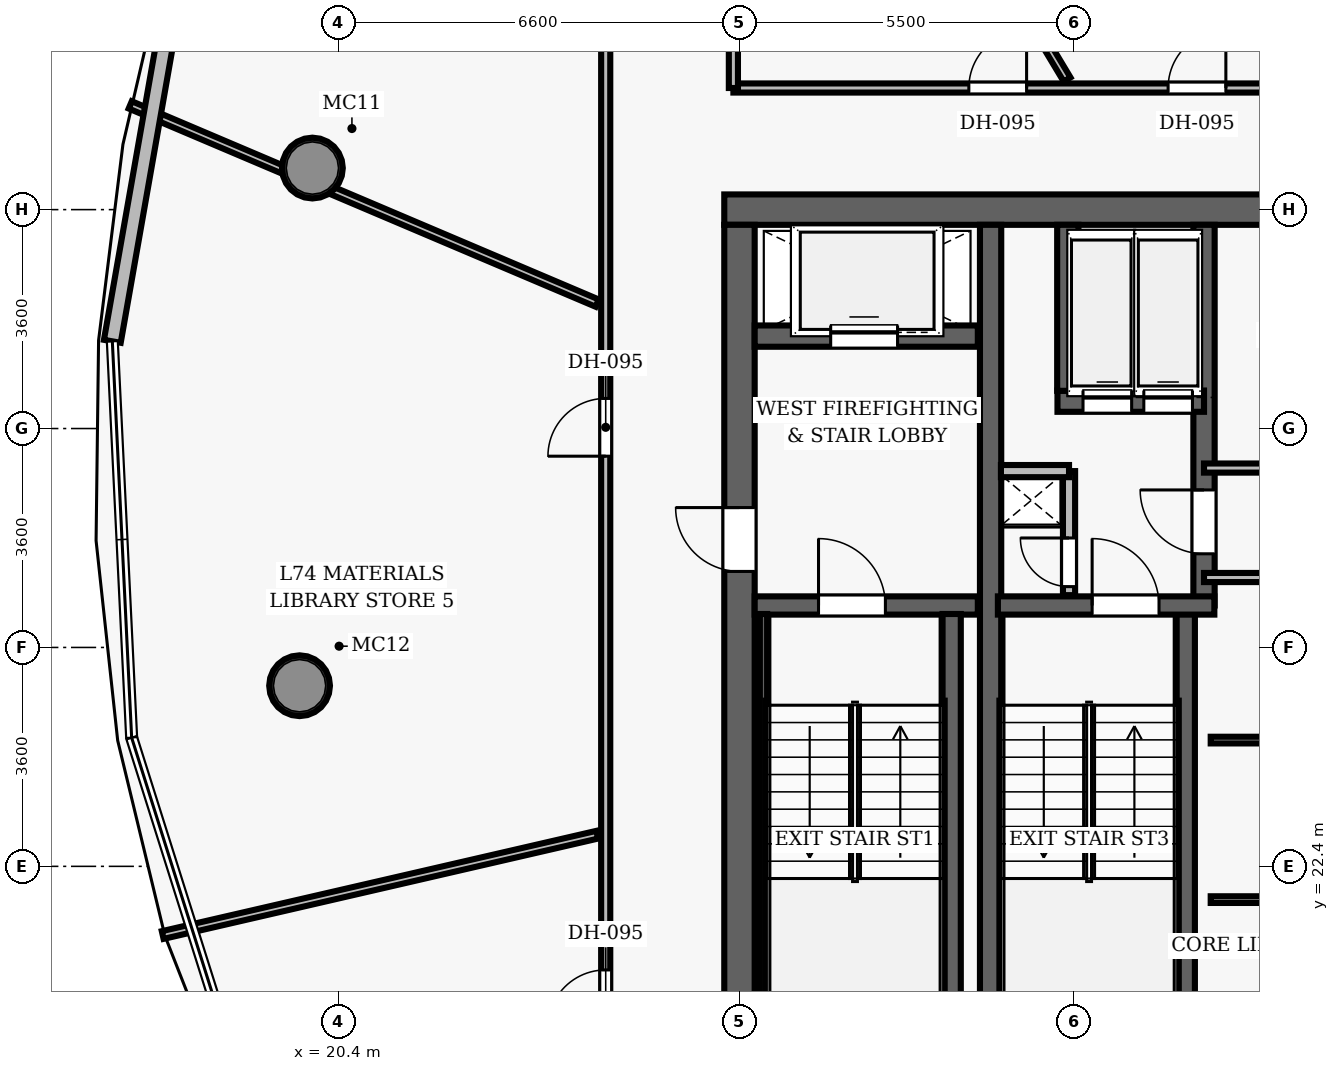
"""IFC4 building model, lengths in metres.
Left out: names, types, materials, properties, quantities, classifications, styles, units other than length and angle.
Written with IfcOpenShell. Run it as: python <this file> out.ifc"""

import sys

from ifc_helpers import new_model, si_unit, direction, frame, frame_2d, origin, origin_2d, place, context, subcontext, project, spatial, rectangle, hollow_circle, extrude, element, fill, save


model = new_model("IFC4")
c1 = context("Model", 3, precision=1e-05, world=origin(), true_north=direction((0.0, 1.0)))
c2 = subcontext(c1, "Body", "Model", "MODEL_VIEW")
j1 = project(units=[si_unit("LENGTHUNIT", "METRE"), si_unit("PLANEANGLEUNIT", "RADIAN")], contexts=[c1])
p1 = place(None, origin())
s1 = spatial("IfcSite", under=j1, at=p1, CompositionType="ELEMENT")
p2 = place(p1, origin())
s2 = spatial("IfcBuilding", under=s1, at=p2, CompositionType="ELEMENT")
p3 = place(p2, frame((0.0, 0.0, 292.1)))
s3 = spatial("IfcBuildingStorey", under=s2, at=p3, CompositionType="ELEMENT", Elevation=292.1)
p4 = place(p3, frame((26.75, 33.2, 0.0), z_axis=(0.0, 0.0, 1.0), x_axis=(1.0, 0.0, 0.0)))
e1 = element("IfcWall", 1, at=p4, inside=s3, PredefinedType="SHEAR", context=c2, shape_type="SweptSolid", body=[
    extrude(rectangle(XDim=22.5, YDim=0.5, at=frame_2d((11.25, 0.0))), origin(), (0.0, 0.0, 1.0), 3.85),
])
p5 = place(p3, frame((27.0, 19.05, 0.0), z_axis=(0.0, 0.0, 1.0), x_axis=(0.0, 1.0, 0.0)))
e2 = element("IfcWall", 2, at=p5, inside=s3, PredefinedType="SHEAR", context=c2, shape_type="SweptSolid", body=[
    extrude(rectangle(XDim=13.9, YDim=0.5, at=frame_2d((6.95, 0.0))), origin(), (0.0, 0.0, 1.0), 3.85),
])
p6 = place(p5, frame((8.2, 0.0, 0.0)))
e3 = element("IfcOpeningElement", 3, at=p6, cuts=e2, PredefinedType="OPENING", context=c2, shape_type="SweptSolid", body=[
    extrude(rectangle(XDim=1.05, YDim=2.15, at=frame_2d((0.525, 1.075))), frame((0.0, 0.26, 0.0), z_axis=(0.0, -1.0, 0.0), x_axis=(1.0, 0.0, 0.0)), (0.0, 0.0, 1.0), 0.52),
])
p7 = place(p3, frame((31.13, 19.05, 0.0), z_axis=(0.0, 0.0, 1.0), x_axis=(0.0, 1.0, 0.0)))
e4 = element("IfcWall", 4, at=p7, inside=s3, PredefinedType="SHEAR", context=c2, shape_type="SweptSolid", body=[
    extrude(rectangle(XDim=13.9, YDim=0.35, at=frame_2d((6.95, 0.0))), origin(), (0.0, 0.0, 1.0), 3.85),
])
for number, where, z_axis, x_axis in (
    (5, (19.976, 33.884, 0.0), (0.0, 0.0, 1.0), (1.0, 0.0, 0.0)),
    (6, (19.765, 25.371, 0.0), (0.0, 0.0, 1.0), (1.0, 0.0, 0.0)),
):
    element("IfcColumn", number, at=place(p3, frame(where, z_axis=z_axis, x_axis=x_axis)), inside=s3, PredefinedType="COLUMN", context=c2, shape_type="SweptSolid", body=[
        extrude(hollow_circle(Radius=0.5, WallThickness=0.045, at=origin_2d()), origin(), (0.0, 0.0, 1.0), 3.85),
    ])
p8 = place(p3, frame((27.25, 26.69, 0.0), z_axis=(0.0, 0.0, 1.0), x_axis=(1.0, 0.0, 0.0)))
e7 = element("IfcWall", 7, at=p8, inside=s3, PredefinedType="SHEAR", context=c2, shape_type="SweptSolid", body=[
    extrude(rectangle(XDim=3.67, YDim=0.3, at=frame_2d((1.835, 0.0))), origin(), (0.0, 0.0, 1.0), 3.85),
])
p9 = place(p8, frame((1.05, 0.0, 0.0)))
e8 = element("IfcOpeningElement", 8, at=p9, cuts=e7, PredefinedType="OPENING", context=c2, shape_type="SweptSolid", body=[
    extrude(rectangle(XDim=1.1, YDim=2.15, at=frame_2d((0.55, 1.075))), frame((0.0, 0.16, 0.0), z_axis=(0.0, -1.0, 0.0), x_axis=(1.0, 0.0, 0.0)), (0.0, 0.0, 1.0), 0.32),
])
p10 = place(p3, frame((30.49, 19.05, 0.0), z_axis=(0.0, 0.0, 1.0), x_axis=(0.0, 1.0, 0.0)))
e9 = element("IfcWall", 9, at=p10, inside=s3, PredefinedType="SHEAR", context=c2, shape_type="SweptSolid", body=[
    extrude(rectangle(XDim=7.5, YDim=0.3, at=frame_2d((3.75, 0.0))), origin(), (0.0, 0.0, 1.0), 3.85),
])
p11 = place(p3, frame((27.395, 19.1, 0.0), z_axis=(0.0, 0.0, 1.0), x_axis=(0.0, 1.0, 0.0)))
e10 = element("IfcWall", 10, at=p11, inside=s3, PredefinedType="SHEAR", context=c2, shape_type="SweptSolid", body=[
    extrude(rectangle(XDim=7.45, YDim=0.12, at=frame_2d((3.725, 0.0))), origin(), (0.0, 0.0, 1.0), 3.85),
])
p12 = place(p3, frame((27.25, 31.12, 0.0), z_axis=(0.0, 0.0, 1.0), x_axis=(1.0, 0.0, 0.0)))
e11 = element("IfcWall", 11, at=p12, inside=s3, PredefinedType="SHEAR", context=c2, shape_type="SweptSolid", body=[
    extrude(rectangle(XDim=3.67, YDim=0.35, at=frame_2d((1.835, 0.0))), origin(), (0.0, 0.0, 1.0), 3.04),
])
p13 = place(p12, frame((1.25, 0.0, 0.0)))
e12 = element("IfcOpeningElement", 12, at=p13, cuts=e11, PredefinedType="OPENING", context=c2, shape_type="SweptSolid", body=[
    extrude(rectangle(XDim=1.1, YDim=2.15, at=frame_2d((0.55, 1.075))), frame((0.0, 0.185, 0.0), z_axis=(0.0, -1.0, 0.0), x_axis=(1.0, 0.0, 0.0)), (0.0, 0.0, 1.0), 0.37),
])
p14 = place(p3, frame((34.34, 19.05, 0.0), z_axis=(0.0, 0.0, 1.0), x_axis=(0.0, 1.0, 0.0)))
e13 = element("IfcWall", 13, at=p14, inside=s3, PredefinedType="SHEAR", context=c2, shape_type="SweptSolid", body=[
    extrude(rectangle(XDim=7.5, YDim=0.3, at=frame_2d((3.75, 0.0))), origin(), (0.0, 0.0, 1.0), 3.85),
])
p15 = place(p3, frame((34.64, 26.69, 0.0), z_axis=(0.0, 0.0, 1.0), x_axis=(0.0, 1.0, 0.0)))
e14 = element("IfcWall", 14, at=p15, inside=s3, PredefinedType="SHEAR", context=c2, shape_type="SweptSolid", body=[
    extrude(rectangle(XDim=6.26, YDim=0.35, at=frame_2d((3.13, 0.0))), origin(), (0.0, 0.0, 1.0), 3.85),
])
p16 = place(p15, frame((0.85, 0.0, 0.0)))
e15 = element("IfcOpeningElement", 15, at=p16, cuts=e14, PredefinedType="OPENING", context=c2, shape_type="SweptSolid", body=[
    extrude(rectangle(XDim=1.05, YDim=2.15, at=frame_2d((0.525, 1.075))), frame((0.0, 0.185, 0.0), z_axis=(0.0, -1.0, 0.0), x_axis=(1.0, 0.0, 0.0)), (0.0, 0.0, 1.0), 0.37),
])
p17 = place(p3, frame((31.25, 26.69, 0.0), z_axis=(0.0, 0.0, 1.0), x_axis=(1.0, 0.0, 0.0)))
e16 = element("IfcWall", 16, at=p17, inside=s3, PredefinedType="SHEAR", context=c2, shape_type="SweptSolid", body=[
    extrude(rectangle(XDim=3.56, YDim=0.3, at=frame_2d((1.78, 0.0))), origin(), (0.0, 0.0, 1.0), 3.85),
])
p18 = place(p17, frame((1.55, 0.0, 0.0)))
e17 = element("IfcOpeningElement", 17, at=p18, cuts=e16, PredefinedType="OPENING", context=c2, shape_type="SweptSolid", body=[
    extrude(rectangle(XDim=1.1, YDim=2.15, at=frame_2d((0.55, 1.075))), frame((0.0, 0.16, 0.0), z_axis=(0.0, -1.0, 0.0), x_axis=(1.0, 0.0, 0.0)), (0.0, 0.0, 1.0), 0.32),
])
p19 = place(p3, frame((32.23, 30.05, 0.0), z_axis=(0.0, 0.0, 1.0), x_axis=(1.0, 0.0, 0.0)))
e18 = element("IfcWall", 18, at=p19, inside=s3, PredefinedType="SHEAR", context=c2, shape_type="SweptSolid", body=[
    extrude(rectangle(XDim=2.41, YDim=0.35, at=frame_2d((1.205, 0.0))), origin(), (0.0, 0.0, 1.0), 3.04),
])
p20 = place(p19, frame((0.42, 0.0, 0.0)))
e19 = element("IfcOpeningElement", 19, at=p20, cuts=e18, PredefinedType="OPENING", context=c2, shape_type="SweptSolid", body=[
    extrude(rectangle(XDim=0.8, YDim=2.15, at=frame_2d((0.4, 1.075))), frame((0.0, 0.185, 0.0), z_axis=(0.0, -1.0, 0.0), x_axis=(1.0, 0.0, 0.0)), (0.0, 0.0, 1.0), 0.37),
])
p21 = place(p19, frame((1.42, 0.0, 0.0)))
e20 = element("IfcOpeningElement", 20, at=p21, cuts=e18, PredefinedType="OPENING", context=c2, shape_type="SweptSolid", body=[
    extrude(rectangle(XDim=0.8, YDim=2.15, at=frame_2d((0.4, 1.075))), frame((0.0, 0.185, 0.0), z_axis=(0.0, -1.0, 0.0), x_axis=(1.0, 0.0, 0.0)), (0.0, 0.0, 1.0), 0.37),
])
p22 = place(p3, frame((32.4, 30.22, 0.0), z_axis=(0.0, 0.0, 1.0), x_axis=(0.0, 1.0, 0.0)))
e21 = element("IfcWall", 21, at=p22, inside=s3, PredefinedType="SHEAR", context=c2, shape_type="SweptSolid", body=[
    extrude(rectangle(XDim=2.73, YDim=0.35, at=frame_2d((1.365, 0.0))), origin(), (0.0, 0.0, 1.0), 3.04),
])
p23 = place(p3, frame((32.42, 26.86, 0.0), z_axis=(0.0, 0.0, 1.0), x_axis=(0.0, 1.0, 0.0)))
e22 = element("IfcWall", 22, at=p23, inside=s3, PredefinedType="PARTITIONING", context=c2, shape_type="SweptSolid", body=[
    extrude(rectangle(XDim=2.04, YDim=0.2, at=frame_2d((1.02, 0.0))), origin(), (0.0, 0.0, 1.0), 3.04),
])
p24 = place(p23, frame((0.14, 0.0, 0.0)))
e23 = element("IfcOpeningElement", 23, at=p24, cuts=e22, PredefinedType="OPENING", context=c2, shape_type="SweptSolid", body=[
    extrude(rectangle(XDim=0.8, YDim=2.05, at=frame_2d((0.4, 1.025))), frame((0.0, 0.11, 0.0), z_axis=(0.0, -1.0, 0.0), x_axis=(1.0, 0.0, 0.0)), (0.0, 0.0, 1.0), 0.22),
])
p25 = place(p3, frame((31.3, 28.9, 0.0), z_axis=(0.0, 0.0, 1.0), x_axis=(1.0, 0.0, 0.0)))
e24 = element("IfcWall", 24, at=p25, inside=s3, PredefinedType="PARTITIONING", context=c2, shape_type="SweptSolid", body=[
    extrude(rectangle(XDim=1.12, YDim=0.2, at=frame_2d((0.56, 0.0))), origin(), (0.0, 0.0, 1.0), 3.04),
])
for number, where, z_axis, x_axis in (
    (25, (34.64, 27.15, 0.0), (0.0, 0.0, 1.0), (1.0, 0.0, 0.0)),
    (26, (34.64, 28.95, 0.0), (0.0, 0.0, 1.0), (1.0, 0.0, 0.0)),
):
    element("IfcWall", number, at=place(p3, frame(where, z_axis=z_axis, x_axis=x_axis)), inside=s3, PredefinedType="PARTITIONING", context=c2, shape_type="SweptSolid", body=[
        extrude(rectangle(XDim=6.36, YDim=0.15, at=frame_2d((3.18, 0.0))), origin(), (0.0, 0.0, 1.0), 3.04),
    ])
for number, where, z_axis, x_axis in (
    (27, (34.75, 21.853, 0.0), (0.0, 0.0, 1.0), (1.0, 0.0, 0.0)),
    (28, (34.75, 24.477, 0.0), (0.0, 0.0, 1.0), (1.0, 0.0, 0.0)),
):
    element("IfcWall", number, at=place(p3, frame(where, z_axis=z_axis, x_axis=x_axis)), inside=s3, PredefinedType="PARTITIONING", context=c2, shape_type="SweptSolid", body=[
        extrude(rectangle(XDim=6.25, YDim=0.11, at=frame_2d((3.125, 0.0))), origin(), (0.0, 0.0, 1.0), 3.04),
    ])
p26 = place(p3, frame((26.9, 35.2, 0.0), z_axis=(0.0, 0.0, 1.0), x_axis=(1.0, 0.0, 0.0)))
e29 = element("IfcWall", 29, at=p26, inside=s3, PredefinedType="PARTITIONING", context=c2, shape_type="SweptSolid", body=[
    extrude(rectangle(XDim=10.05, YDim=0.15, at=frame_2d((5.025, 0.0))), origin(), (0.0, 0.0, 1.0), 3.04),
])
p27 = place(p26, frame((7.149, 0.0, 0.0)))
e30 = element("IfcOpeningElement", 30, at=p27, cuts=e29, PredefinedType="OPENING", context=c2, shape_type="SweptSolid", body=[
    extrude(rectangle(XDim=0.95, YDim=2.15, at=frame_2d((0.475, 1.075))), frame((0.0, 0.085, 0.0), z_axis=(0.0, -1.0, 0.0), x_axis=(1.0, 0.0, 0.0)), (0.0, 0.0, 1.0), 0.17),
])
p28 = place(p26, frame((3.872, 0.0, 0.0)))
e31 = element("IfcOpeningElement", 31, at=p28, cuts=e29, PredefinedType="OPENING", context=c2, shape_type="SweptSolid", body=[
    extrude(rectangle(XDim=0.95, YDim=2.15, at=frame_2d((0.475, 1.075))), frame((0.0, 0.085, 0.0), z_axis=(0.0, -1.0, 0.0), x_axis=(1.0, 0.0, 0.0)), (0.0, 0.0, 1.0), 0.17),
])
p29 = place(p3, frame((24.8, 11.222, 0.0), z_axis=(0.0, 0.0, 1.0), x_axis=(0.0, 1.0, 0.0)))
e32 = element("IfcWall", 32, at=p29, inside=s3, PredefinedType="PARTITIONING", context=c2, shape_type="SweptSolid", body=[
    extrude(rectangle(XDim=30.177, YDim=0.15, at=frame_2d((15.089, 0.0))), origin(), (0.0, 0.0, 1.0), 3.04),
])
p30 = place(p29, frame((17.923, 0.0, 0.0)))
e33 = element("IfcOpeningElement", 33, at=p30, cuts=e32, PredefinedType="OPENING", context=c2, shape_type="SweptSolid", body=[
    extrude(rectangle(XDim=0.95, YDim=2.15, at=frame_2d((0.475, 1.075))), frame((0.0, 0.085, 0.0), z_axis=(0.0, -1.0, 0.0), x_axis=(1.0, 0.0, 0.0)), (0.0, 0.0, 1.0), 0.17),
])
p31 = place(p29, frame((8.524, 0.0, 0.0)))
e34 = element("IfcOpeningElement", 34, at=p31, cuts=e32, PredefinedType="OPENING", context=c2, shape_type="SweptSolid", body=[
    extrude(rectangle(XDim=0.95, YDim=2.15, at=frame_2d((0.475, 1.075))), frame((0.0, 0.085, 0.0), z_axis=(0.0, -1.0, 0.0), x_axis=(1.0, 0.0, 0.0)), (0.0, 0.0, 1.0), 0.17),
])
p32 = place(p3, frame((26.9, 35.2, 0.0), z_axis=(0.0, 0.0, 1.0), x_axis=(0.0, 1.0, 0.0)))
e35 = element("IfcWall", 35, at=p32, inside=s3, PredefinedType="PARTITIONING", context=c2, shape_type="SweptSolid", body=[
    extrude(rectangle(XDim=6.2, YDim=0.15, at=frame_2d((3.1, 0.0))), origin(), (0.0, 0.0, 1.0), 3.04),
])
p33 = place(p3, frame((32.388, 35.34, 0.0), z_axis=(0.0, 0.0, 1.0), x_axis=(-0.515046773067, 0.857162074262, 0.0)))
e36 = element("IfcWall", 36, at=p33, inside=s3, PredefinedType="PARTITIONING", context=c2, shape_type="SweptSolid", body=[
    extrude(rectangle(XDim=15.374, YDim=0.13, at=frame_2d((7.687, 0.0))), origin(), (0.0, 0.0, 1.0), 3.04),
])
p34 = place(p3, frame((24.66, 31.663, 0.0), z_axis=(0.0, 0.0, 1.0), x_axis=(-0.920507798558, 0.390724190182, 0.0)))
e37 = element("IfcWall", 37, at=p34, inside=s3, PredefinedType="PARTITIONING", context=c2, shape_type="SweptSolid", body=[
    extrude(rectangle(XDim=8.343, YDim=0.13, at=frame_2d((4.171, 0.0))), origin(), (0.0, 0.0, 1.0), 3.04),
])
p35 = place(p3, frame((24.66, 22.92, 0.0), z_axis=(0.0, 0.0, 1.0), x_axis=(-0.974372115757, -0.224942170425, 0.0)))
e38 = element("IfcWall", 38, at=p35, inside=s3, PredefinedType="PARTITIONING", context=c2, shape_type="SweptSolid", body=[
    extrude(rectangle(XDim=7.334, YDim=0.13, at=frame_2d((3.667, 0.0))), origin(), (0.0, 0.0, 1.0), 3.04),
])
p36 = place(p3, frame((16.686, 31.034, 0.0), z_axis=(0.0, 0.0, 1.0), x_axis=(0.173258520221, 0.984876380654, 0.0)))
e39 = element("IfcWall", 39, at=p36, inside=s3, PredefinedType="SOLIDWALL", context=c2, shape_type="SweptSolid", body=[
    extrude(rectangle(XDim=6.345, YDim=0.28, at=frame_2d((3.173, 0.0))), origin(), (0.0, 0.0, 1.0), 3.625),
])
p37 = place(p9, origin())
e40 = element("IfcDoor", 40, at=p37, inside=s3, OperationType="SINGLE_SWING_LEFT", PredefinedType="DOOR", context=c2, shape_type="SweptSolid", body=[
    extrude(rectangle(XDim=1.1, YDim=2.15, at=frame_2d((0.55, 1.075))), frame((0.0, 0.025, 0.0), z_axis=(0.0, -1.0, 0.0), x_axis=(1.0, 0.0, 0.0)), (0.0, 0.0, 1.0), 0.05),
])
fill(e8, e40)
p38 = place(p6, origin())
e41 = element("IfcDoor", 41, at=p38, inside=s3, OperationType="SINGLE_SWING_RIGHT", PredefinedType="DOOR", context=c2, shape_type="SweptSolid", body=[
    extrude(rectangle(XDim=1.05, YDim=2.15, at=frame_2d((0.525, 1.075))), frame((0.0, 0.025, 0.0), z_axis=(0.0, -1.0, 0.0), x_axis=(1.0, 0.0, 0.0)), (0.0, 0.0, 1.0), 0.05),
])
fill(e3, e41)
p39 = place(p18, origin())
e42 = element("IfcDoor", 42, at=p39, inside=s3, OperationType="SINGLE_SWING_LEFT", PredefinedType="DOOR", context=c2, shape_type="SweptSolid", body=[
    extrude(rectangle(XDim=1.1, YDim=2.15, at=frame_2d((0.55, 1.075))), frame((0.0, 0.025, 0.0), z_axis=(0.0, -1.0, 0.0), x_axis=(1.0, 0.0, 0.0)), (0.0, 0.0, 1.0), 0.05),
])
fill(e17, e42)
p40 = place(p24, origin())
e43 = element("IfcDoor", 43, at=p40, inside=s3, OperationType="SINGLE_SWING_RIGHT", PredefinedType="DOOR", context=c2, shape_type="SweptSolid", body=[
    extrude(rectangle(XDim=0.8, YDim=2.05, at=frame_2d((0.4, 1.025))), frame((0.0, 0.025, 0.0), z_axis=(0.0, -1.0, 0.0), x_axis=(1.0, 0.0, 0.0)), (0.0, 0.0, 1.0), 0.05),
])
fill(e23, e43)
p41 = place(p16, origin())
e44 = element("IfcDoor", 44, at=p41, inside=s3, OperationType="SINGLE_SWING_RIGHT", PredefinedType="DOOR", context=c2, shape_type="SweptSolid", body=[
    extrude(rectangle(XDim=1.05, YDim=2.15, at=frame_2d((0.525, 1.075))), frame((0.0, 0.025, 0.0), z_axis=(0.0, -1.0, 0.0), x_axis=(1.0, 0.0, 0.0)), (0.0, 0.0, 1.0), 0.05),
])
fill(e15, e44)
p42 = place(p27, origin())
e45 = element("IfcDoor", 45, at=p42, inside=s3, OperationType="SINGLE_SWING_RIGHT", PredefinedType="DOOR", context=c2, shape_type="SweptSolid", body=[
    extrude(rectangle(XDim=0.95, YDim=2.15, at=frame_2d((0.475, 1.075))), frame((0.0, 0.025, 0.0), z_axis=(0.0, -1.0, 0.0), x_axis=(1.0, 0.0, 0.0)), (0.0, 0.0, 1.0), 0.05),
])
fill(e30, e45)
p43 = place(p28, origin())
e46 = element("IfcDoor", 46, at=p43, inside=s3, OperationType="SINGLE_SWING_RIGHT", PredefinedType="DOOR", context=c2, shape_type="SweptSolid", body=[
    extrude(rectangle(XDim=0.95, YDim=2.15, at=frame_2d((0.475, 1.075))), frame((0.0, 0.025, 0.0), z_axis=(0.0, -1.0, 0.0), x_axis=(1.0, 0.0, 0.0)), (0.0, 0.0, 1.0), 0.05),
])
fill(e31, e46)
p44 = place(p30, origin())
e47 = element("IfcDoor", 47, at=p44, inside=s3, OperationType="SINGLE_SWING_LEFT", PredefinedType="DOOR", context=c2, shape_type="SweptSolid", body=[
    extrude(rectangle(XDim=0.95, YDim=2.15, at=frame_2d((0.475, 1.075))), frame((0.0, 0.025, 0.0), z_axis=(0.0, -1.0, 0.0), x_axis=(1.0, 0.0, 0.0)), (0.0, 0.0, 1.0), 0.05),
])
fill(e33, e47)
p45 = place(p31, origin())
e48 = element("IfcDoor", 48, at=p45, inside=s3, OperationType="SINGLE_SWING_LEFT", PredefinedType="DOOR", context=c2, shape_type="SweptSolid", body=[
    extrude(rectangle(XDim=0.95, YDim=2.15, at=frame_2d((0.475, 1.075))), frame((0.0, 0.025, 0.0), z_axis=(0.0, -1.0, 0.0), x_axis=(1.0, 0.0, 0.0)), (0.0, 0.0, 1.0), 0.05),
])
fill(e34, e48)
p46 = place(p13, origin())
e49 = element("IfcDoor", 49, at=p46, inside=s3, OperationType="SLIDING_TO_LEFT", PredefinedType="DOOR", context=c2, shape_type="SweptSolid", body=[
    extrude(rectangle(XDim=1.1, YDim=2.15, at=frame_2d((0.55, 1.075))), frame((0.0, 0.025, 0.0), z_axis=(0.0, -1.0, 0.0), x_axis=(1.0, 0.0, 0.0)), (0.0, 0.0, 1.0), 0.05),
])
fill(e12, e49)
p47 = place(p20, origin())
e50 = element("IfcDoor", 50, at=p47, inside=s3, OperationType="SLIDING_TO_LEFT", PredefinedType="DOOR", context=c2, shape_type="SweptSolid", body=[
    extrude(rectangle(XDim=0.8, YDim=2.15, at=frame_2d((0.4, 1.075))), frame((0.0, 0.025, 0.0), z_axis=(0.0, -1.0, 0.0), x_axis=(1.0, 0.0, 0.0)), (0.0, 0.0, 1.0), 0.05),
])
fill(e19, e50)
p48 = place(p21, origin())
e51 = element("IfcDoor", 51, at=p48, inside=s3, OperationType="SLIDING_TO_LEFT", PredefinedType="DOOR", context=c2, shape_type="SweptSolid", body=[
    extrude(rectangle(XDim=0.8, YDim=2.15, at=frame_2d((0.4, 1.075))), frame((0.0, 0.025, 0.0), z_axis=(0.0, -1.0, 0.0), x_axis=(1.0, 0.0, 0.0)), (0.0, 0.0, 1.0), 0.05),
])
fill(e20, e51)
save(model, sys.argv[1])
